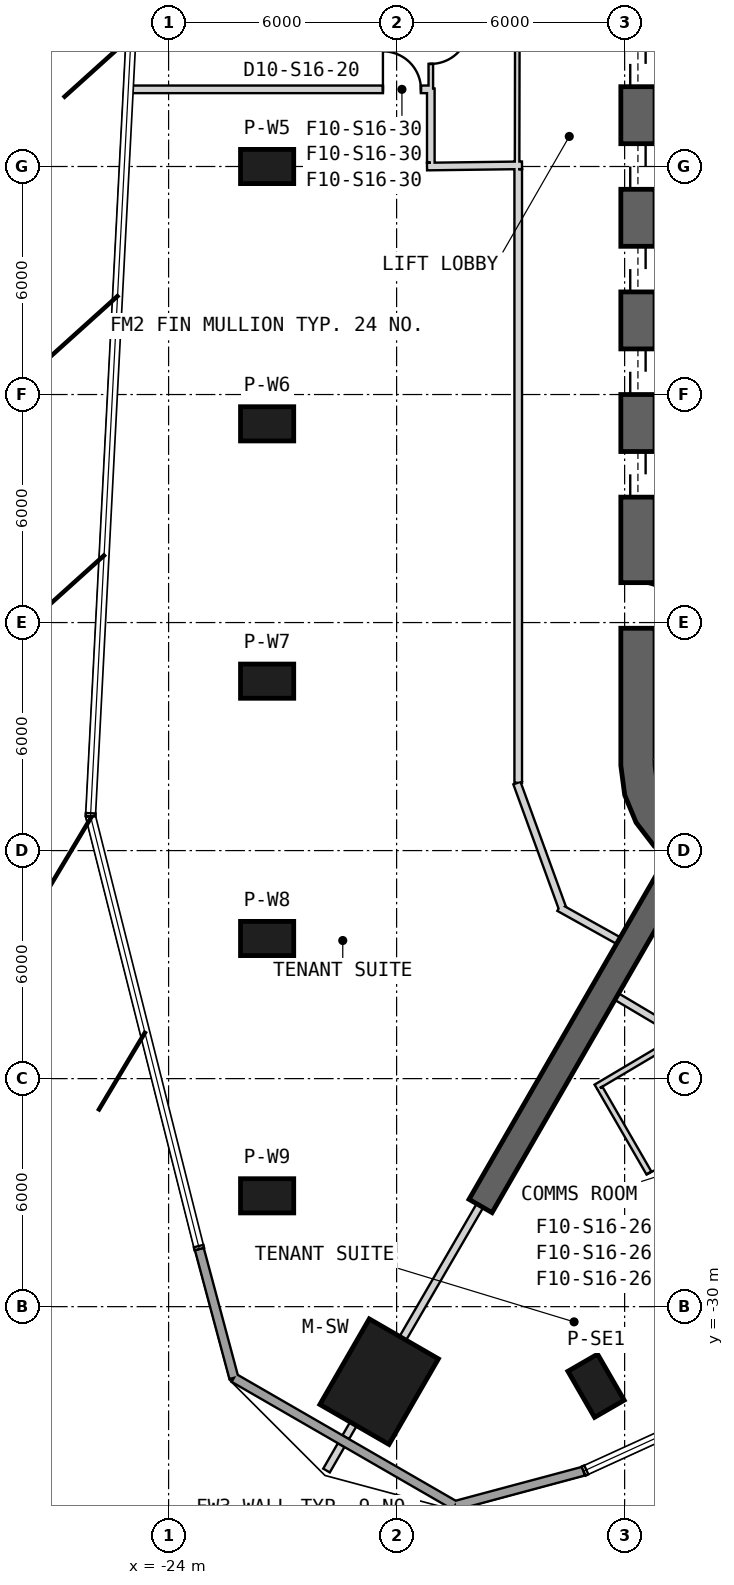
"""IFC4 building model, lengths in metres.
Left out: names, types, materials, properties, quantities, classifications, styles, units other than length and angle.
Written with IfcOpenShell. Run it as: python <this file> out.ifc"""

import sys

from ifc_helpers import new_model, si_unit, direction, frame, frame_2d, origin, origin_2d, place, context, subcontext, project, spatial, polyline, rectangle, outline, extrude, element, fill, save


model = new_model("IFC4")
c1 = context("Model", 3, precision=1e-05, world=origin(), true_north=direction((0.0, 1.0)))
c2 = subcontext(c1, "Body", "Model", "MODEL_VIEW")
j1 = project(units=[si_unit("LENGTHUNIT", "METRE"), si_unit("PLANEANGLEUNIT", "RADIAN")], contexts=[c1])
p1 = place(None, origin())
s1 = spatial("IfcSite", under=j1, at=p1, CompositionType="ELEMENT")
p2 = place(p1, origin())
s2 = spatial("IfcBuilding", under=s1, at=p2, CompositionType="ELEMENT")
p3 = place(p2, frame((0.0, 0.0, 253.2)))
s3 = spatial("IfcBuildingStorey", under=s2, at=p3, CompositionType="ELEMENT", Elevation=253.2)
p4 = place(p3, frame((-18.46, -31.974, 0.0), z_axis=(0.0, 0.0, 1.0), x_axis=(-0.5, -0.866025403784, 0.0)))
e1 = element("IfcColumn", 1, at=p4, inside=s3, PredefinedType="COLUMN", context=c2, shape_type="SweptSolid", body=[
    extrude(rectangle(XDim=2.6, YDim=2.1, at=origin_2d()), origin(), (0.0, 0.0, 1.0), 4.0),
])
for number, where, z_axis, x_axis in (
    (2, (-21.407, 0.0, 0.0), (0.0, 0.0, 1.0), (-1.0, 0.0, 0.0)),
    (3, (-21.407, -6.771, 0.0), (0.0, 0.0, 1.0), (-1.0, 0.0, 0.0)),
    (4, (-21.407, -13.542, 0.0), (0.0, 0.0, 1.0), (-1.0, 0.0, 0.0)),
    (5, (-21.407, -20.313, 0.0), (0.0, 0.0, 1.0), (-1.0, 0.0, 0.0)),
    (6, (-21.407, -27.084, 0.0), (0.0, 0.0, 1.0), (-1.0, 0.0, 0.0)),
    (7, (-12.752, -32.081, 0.0), (0.0, 0.0, 1.0), (0.5, -0.866, 0.0)),
):
    element("IfcColumn", number, at=place(p3, frame(where, z_axis=z_axis, x_axis=x_axis)), inside=s3, PredefinedType="COLUMN", context=c2, shape_type="SweptSolid", body=[
        extrude(rectangle(XDim=1.4, YDim=0.9, at=origin_2d()), origin(), (0.0, 0.0, 1.0), 4.0),
    ])
p5 = place(p3, frame((-11.65, 15.762, 0.0), z_axis=(0.0, 0.0, 1.0), x_axis=(0.0, -1.0, 0.0)))
e8 = element("IfcWall", 8, at=p5, inside=s3, PredefinedType="SHEAR", context=c2, shape_type="SweptSolid", body=[
    extrude(rectangle(XDim=31.523, YDim=0.9, at=frame_2d((15.762, 0.0))), origin(), (0.0, 0.0, 1.0), 4.0),
])
p6 = place(p5, frame((7.062, 0.0, 0.0)))
e9 = element("IfcOpeningElement", 9, at=p6, cuts=e8, PredefinedType="OPENING", context=c2, shape_type="SweptSolid", body=[
    extrude(rectangle(XDim=1.2, YDim=2.4, at=frame_2d((0.6, 1.2))), frame((0.0, 0.46, 0.0), z_axis=(0.0, -1.0, 0.0), x_axis=(1.0, 0.0, 0.0)), (0.0, 0.0, 1.0), 0.92),
])
p7 = place(p5, frame((9.762, 0.0, 0.0)))
e10 = element("IfcOpeningElement", 10, at=p7, cuts=e8, PredefinedType="OPENING", context=c2, shape_type="SweptSolid", body=[
    extrude(rectangle(XDim=1.2, YDim=2.4, at=frame_2d((0.6, 1.2))), frame((0.0, 0.46, 0.0), z_axis=(0.0, -1.0, 0.0), x_axis=(1.0, 0.0, 0.0)), (0.0, 0.0, 1.0), 0.92),
])
p8 = place(p5, frame((12.462, 0.0, 0.0)))
e11 = element("IfcOpeningElement", 11, at=p8, cuts=e8, PredefinedType="OPENING", context=c2, shape_type="SweptSolid", body=[
    extrude(rectangle(XDim=1.2, YDim=2.4, at=frame_2d((0.6, 1.2))), frame((0.0, 0.46, 0.0), z_axis=(0.0, -1.0, 0.0), x_axis=(1.0, 0.0, 0.0)), (0.0, 0.0, 1.0), 0.92),
])
p9 = place(p5, frame((15.162, 0.0, 0.0)))
e12 = element("IfcOpeningElement", 12, at=p9, cuts=e8, PredefinedType="OPENING", context=c2, shape_type="SweptSolid", body=[
    extrude(rectangle(XDim=1.2, YDim=2.4, at=frame_2d((0.6, 1.2))), frame((0.0, 0.46, 0.0), z_axis=(0.0, -1.0, 0.0), x_axis=(1.0, 0.0, 0.0)), (0.0, 0.0, 1.0), 0.92),
])
p10 = place(p5, frame((17.862, 0.0, 0.0)))
e13 = element("IfcOpeningElement", 13, at=p10, cuts=e8, PredefinedType="OPENING", context=c2, shape_type="SweptSolid", body=[
    extrude(rectangle(XDim=1.2, YDim=2.4, at=frame_2d((0.6, 1.2))), frame((0.0, 0.46, 0.0), z_axis=(0.0, -1.0, 0.0), x_axis=(1.0, 0.0, 0.0)), (0.0, 0.0, 1.0), 0.92),
])
p11 = place(p5, frame((20.562, 0.0, 0.0)))
e14 = element("IfcOpeningElement", 14, at=p11, cuts=e8, PredefinedType="OPENING", context=c2, shape_type="SweptSolid", body=[
    extrude(rectangle(XDim=1.2, YDim=2.4, at=frame_2d((0.6, 1.2))), frame((0.0, 0.46, 0.0), z_axis=(0.0, -1.0, 0.0), x_axis=(1.0, 0.0, 0.0)), (0.0, 0.0, 1.0), 0.92),
])
p12 = place(p5, frame((23.262, 0.0, 0.0)))
e15 = element("IfcOpeningElement", 15, at=p12, cuts=e8, PredefinedType="OPENING", context=c2, shape_type="SweptSolid", body=[
    extrude(rectangle(XDim=1.2, YDim=2.4, at=frame_2d((0.6, 1.2))), frame((0.0, 0.46, 0.0), z_axis=(0.0, -1.0, 0.0), x_axis=(1.0, 0.0, 0.0)), (0.0, 0.0, 1.0), 0.92),
])
p13 = place(p5, frame((3.612, 0.0, 0.0)))
e16 = element("IfcOpeningElement", 16, at=p13, cuts=e8, PredefinedType="OPENING", context=c2, shape_type="SweptSolid", body=[
    extrude(rectangle(XDim=1.2, YDim=2.4, at=frame_2d((0.6, 1.2))), frame((0.0, 0.46, 0.0), z_axis=(0.0, -1.0, 0.0), x_axis=(1.0, 0.0, 0.0)), (0.0, 0.0, 1.0), 0.92),
])
p14 = place(p5, frame((26.712, 0.0, 0.0)))
e17 = element("IfcOpeningElement", 17, at=p14, cuts=e8, PredefinedType="OPENING", context=c2, shape_type="SweptSolid", body=[
    extrude(rectangle(XDim=1.2, YDim=2.4, at=frame_2d((0.6, 1.2))), frame((0.0, 0.46, 0.0), z_axis=(0.0, -1.0, 0.0), x_axis=(1.0, 0.0, 0.0)), (0.0, 0.0, 1.0), 0.92),
])
p15 = place(p3, origin())
e18 = element("IfcWall", 18, at=p15, inside=s3, PredefinedType="SHEAR", context=c2, shape_type="SweptSolid", body=[
    extrude(outline(polyline([(-12.1, -15.762), (-11.998, -16.538), (-11.698, -17.262), (-11.221, -17.883), (-10.6, -18.36), (-9.876, -18.659), (-9.1, -18.762), (-8.323, -18.659), (-7.6, -18.36), (-8.05, -17.58), (-8.556, -17.79), (-9.1, -17.862), (-9.644, -17.79), (-10.15, -17.58), (-10.585, -17.247), (-10.919, -16.812), (-11.128, -16.305), (-11.2, -15.762), (-12.1, -15.762)])), origin(), (0.0, 0.0, 1.0), 4.0),
])
p16 = place(p3, frame((-10.575, -18.316, 0.0), z_axis=(0.0, 0.0, 1.0), x_axis=(-0.500010108608, -0.866019567498, 0.0)))
e19 = element("IfcWall", 19, at=p16, inside=s3, PredefinedType="SHEAR", context=c2, shape_type="SweptSolid", body=[
    extrude(rectangle(XDim=10.432, YDim=0.7, at=frame_2d((5.216, 0.0))), origin(), (0.0, 0.0, 1.0), 4.0),
])
p17 = place(p3, frame((-23.191, -28.484, 0.0), z_axis=(0.0, 0.0, 1.0), x_axis=(0.258818367886, -0.965926007748, 0.0)))
e20 = element("IfcWall", 20, at=p17, inside=s3, PredefinedType="SOLIDWALL", context=c2, shape_type="SweptSolid", body=[
    extrude(rectangle(XDim=3.51, YDim=0.24, at=frame_2d((1.755, 0.0))), origin(), (0.0, 0.0, 1.0), 3.7),
])
p18 = place(p3, frame((-22.283, -31.875, 0.0), z_axis=(0.0, 0.0, 1.0), x_axis=(0.86603253074, -0.499987655547, 0.0)))
e21 = element("IfcWall", 21, at=p18, inside=s3, PredefinedType="SOLIDWALL", context=c2, shape_type="SweptSolid", body=[
    extrude(rectangle(XDim=6.72, YDim=0.24, at=frame_2d((3.36, 0.0))), origin(), (0.0, 0.0, 1.0), 3.7),
])
p19 = place(p3, frame((-16.463, -35.235, 0.0), z_axis=(0.0, 0.0, 1.0), x_axis=(0.965932176707, 0.258795343857, 0.0)))
e22 = element("IfcWall", 22, at=p19, inside=s3, PredefinedType="SOLIDWALL", context=c2, shape_type="SweptSolid", body=[
    extrude(rectangle(XDim=3.501, YDim=0.24, at=frame_2d((1.75, 0.0))), origin(), (0.0, 0.0, 1.0), 3.7),
])
p20 = place(p3, frame((-11.282, -15.541, -0.3), z_axis=(0.0, 0.0, 1.0), x_axis=(0.866000483506, -0.500043160704, 0.0)))
e23 = element("IfcWall", 23, at=p20, inside=s3, PredefinedType="SHEAR", context=c2, shape_type="SweptSolid", body=[
    extrude(rectangle(XDim=3.8, YDim=0.2, at=frame_2d((1.9, 0.0))), origin(), (0.0, 0.0, 1.0), 4.0),
])
p21 = place(p3, frame((-7.196, -8.663, -0.3), z_axis=(0.0, 0.0, 1.0), x_axis=(-0.499997992926, -0.866026562566, 0.0)))
e24 = element("IfcWall", 24, at=p21, inside=s3, PredefinedType="SHEAR", context=c2, shape_type="SweptSolid", body=[
    extrude(rectangle(XDim=7.9, YDim=0.2, at=frame_2d((3.95, 0.0))), origin(), (0.0, 0.0, 1.0), 4.0),
])
p22 = place(p3, frame((-14.8, 16.257, 0.0), z_axis=(0.0, 0.0, 1.0), x_axis=(-0.001847148781, -0.999998294019, 0.0)))
e25 = element("IfcWall", 25, at=p22, inside=s3, PredefinedType="PARTITIONING", context=c2, shape_type="SweptSolid", body=[
    extrude(rectangle(XDim=16.257, YDim=0.12, at=frame_2d((8.128, 0.0))), origin(), (0.0, 0.0, 1.0), 2.98),
])
p23 = place(p22, frame((7.629, 0.0, 0.0)))
e26 = element("IfcOpeningElement", 26, at=p23, cuts=e25, PredefinedType="OPENING", context=c2, shape_type="SweptSolid", body=[
    extrude(rectangle(XDim=1.0, YDim=2.1, at=frame_2d((0.5, 1.05))), frame((0.0, 0.07, 0.0), z_axis=(0.0, -1.0, 0.0), x_axis=(1.0, 0.0, 0.0)), (0.0, 0.0, 1.0), 0.14),
])
p24 = place(p3, frame((-17.1, 4.35, 0.0), z_axis=(0.0, 0.0, 1.0), x_axis=(0.0, -1.0, 0.0)))
e27 = element("IfcWall", 27, at=p24, inside=s3, PredefinedType="PARTITIONING", context=c2, shape_type="SweptSolid", body=[
    extrude(rectangle(XDim=2.3, YDim=0.12, at=frame_2d((1.15, 0.0))), origin(), (0.0, 0.0, 1.0), 3.7),
])
p25 = place(p24, frame((0.65, 0.0, 0.0)))
e28 = element("IfcOpeningElement", 28, at=p25, cuts=e27, PredefinedType="OPENING", context=c2, shape_type="SweptSolid", body=[
    extrude(rectangle(XDim=1.0, YDim=2.1, at=frame_2d((0.5, 1.05))), frame((0.0, 0.07, 0.0), z_axis=(0.0, -1.0, 0.0), x_axis=(1.0, 0.0, 0.0)), (0.0, 0.0, 1.0), 0.14),
])
p26 = place(p3, frame((-17.2, -0.001, 0.0), z_axis=(0.0, 0.0, 1.0), x_axis=(0.999915662945, 0.012987185857, 0.0)))
e29 = element("IfcWall", 29, at=p26, inside=s3, PredefinedType="PARTITIONING", context=c2, shape_type="SweptSolid", body=[
    extrude(rectangle(XDim=2.5, YDim=0.2, at=frame_2d((1.25, 0.0))), origin(), (0.0, 0.0, 1.0), 3.07),
])
p27 = place(p3, frame((-17.1, 2.05, 0.0), z_axis=(0.0, 0.0, 1.0), x_axis=(0.0, -1.0, 0.0)))
e30 = element("IfcWall", 30, at=p27, inside=s3, PredefinedType="PARTITIONING", context=c2, shape_type="SweptSolid", body=[
    extrude(rectangle(XDim=1.95, YDim=0.2, at=frame_2d((0.975, 0.0))), origin(), (0.0, 0.0, 1.0), 3.07),
])
p28 = place(p3, frame((-13.722, -19.499, 0.0), z_axis=(0.0, 0.0, 1.0), x_axis=(0.873381780332, -0.487036205824, 0.0)))
e31 = element("IfcWall", 31, at=p28, inside=s3, PredefinedType="PARTITIONING", context=c2, shape_type="SweptSolid", body=[
    extrude(rectangle(XDim=1.785, YDim=0.2, at=frame_2d((0.892, 0.0))), origin(), (0.0, 0.0, 1.0), 3.7),
])
p29 = place(p3, frame((-14.834, -16.223, 0.0), z_axis=(0.0, 0.0, 1.0), x_axis=(0.342017717312, -0.939693503779, 0.0)))
e32 = element("IfcWall", 32, at=p29, inside=s3, PredefinedType="PARTITIONING", context=c2, shape_type="SweptSolid", body=[
    extrude(rectangle(XDim=3.497, YDim=0.2, at=frame_2d((1.749, 0.0))), origin(), (0.0, 0.0, 1.0), 2.88),
])
p30 = place(p3, frame((-14.8, -0.07, 0.0), z_axis=(0.0, 0.0, 1.0), x_axis=(0.0, -1.0, 0.0)))
e33 = element("IfcWall", 33, at=p30, inside=s3, PredefinedType="PARTITIONING", context=c2, shape_type="SweptSolid", body=[
    extrude(rectangle(XDim=16.147, YDim=0.2, at=frame_2d((8.073, 0.0))), origin(), (0.0, 0.0, 1.0), 2.98),
])
p31 = place(p3, frame((-12.207, -21.844, 0.0), z_axis=(0.0, 0.0, 1.0), x_axis=(0.859839010211, -0.510565251971, 0.0)))
e34 = element("IfcWall", 34, at=p31, inside=s3, PredefinedType="PARTITIONING", context=c2, shape_type="SweptSolid", body=[
    extrude(rectangle(XDim=2.342, YDim=0.2, at=frame_2d((1.171, 0.0))), origin(), (0.0, 0.0, 1.0), 3.7),
])
p32 = place(p3, frame((-25.061, 2.03, 0.0), z_axis=(0.0, 0.0, 1.0), x_axis=(1.0, 0.0, 0.0)))
e35 = element("IfcWall", 35, at=p32, inside=s3, PredefinedType="PARTITIONING", context=c2, shape_type="SweptSolid", body=[
    extrude(rectangle(XDim=7.901, YDim=0.2, at=frame_2d((3.95, 0.0))), origin(), (0.0, 0.0, 1.0), 3.7),
])
p33 = place(p32, frame((6.701, 0.0, 0.0)))
e36 = element("IfcOpeningElement", 36, at=p33, cuts=e35, PredefinedType="OPENING", context=c2, shape_type="SweptSolid", body=[
    extrude(rectangle(XDim=1.0, YDim=2.1, at=frame_2d((0.5, 1.05))), frame((0.0, 0.11, 0.0), z_axis=(0.0, -1.0, 0.0), x_axis=(1.0, 0.0, 0.0)), (0.0, 0.0, 1.0), 0.22),
])
p34 = place(p3, frame((-19.845, -34.312, 0.0), z_axis=(0.0, 0.0, 1.0), x_axis=(0.500151178888, 0.865938103017, 0.0)))
e37 = element("IfcWall", 37, at=p34, inside=s3, PredefinedType="PARTITIONING", context=c2, shape_type="SweptSolid", body=[
    extrude(rectangle(XDim=0.772, YDim=0.2, at=frame_2d((0.386, 0.0))), origin(), (0.0, 0.0, 1.0), 3.7),
])
p35 = place(p3, frame((-19.339, -33.436, 0.0), z_axis=(0.0, 0.0, 1.0), x_axis=(0.499896243657, 0.866085299251, 0.0)))
e38 = element("IfcWall", 38, at=p35, inside=s3, PredefinedType="PARTITIONING", context=c2, shape_type="SweptSolid", body=[
    extrude(rectangle(XDim=0.405, YDim=0.2, at=frame_2d((0.203, 0.0))), origin(), (0.0, 0.0, 1.0), 3.7),
])
p36 = place(p3, frame((-17.836, -30.833, 0.0), z_axis=(0.0, 0.0, 1.0), x_axis=(0.502422862308, 0.864622037326, 0.0)))
e39 = element("IfcWall", 39, at=p36, inside=s3, PredefinedType="PARTITIONING", context=c2, shape_type="SweptSolid", body=[
    extrude(rectangle(XDim=4.038, YDim=0.2, at=frame_2d((2.019, 0.0))), origin(), (0.0, 0.0, 1.0), 3.27),
])
p37 = place(p3, frame((-10.574, -22.93, 0.0), z_axis=(0.0, 0.0, 1.0), x_axis=(-0.86012706177, -0.510079834547, 0.0)))
e40 = element("IfcWall", 40, at=p37, inside=s3, PredefinedType="PLUMBINGWALL", context=c2, shape_type="SweptSolid", body=[
    extrude(rectangle(XDim=2.532, YDim=0.15, at=frame_2d((1.266, 0.0))), origin(), (0.0, 0.0, 1.0), 3.7),
])
p38 = place(p3, frame((-12.65, -24.249, 0.0), z_axis=(0.0, 0.0, 1.0), x_axis=(0.500027264788, -0.866009661879, 0.0)))
e41 = element("IfcWall", 41, at=p38, inside=s3, PredefinedType="PLUMBINGWALL", context=c2, shape_type="SweptSolid", body=[
    extrude(rectangle(XDim=6.24, YDim=0.15, at=frame_2d((3.12, 0.0))), origin(), (0.0, 0.0, 1.0), 2.88),
])
p39 = place(p38, frame((2.583, 0.0, 0.0)))
e42 = element("IfcOpeningElement", 42, at=p39, cuts=e41, PredefinedType="OPENING", context=c2, shape_type="SweptSolid", body=[
    extrude(rectangle(XDim=1.0, YDim=2.1, at=frame_2d((0.5, 1.05))), frame((0.0, 0.085, 0.0), z_axis=(0.0, -1.0, 0.0), x_axis=(1.0, 0.0, 0.0)), (0.0, 0.0, 1.0), 0.17),
])
p40 = place(p25, origin())
e43 = element("IfcDoor", 43, at=p40, inside=s3, OperationType="SINGLE_SWING_LEFT", PredefinedType="NOTDEFINED", context=c2, shape_type="SweptSolid", body=[
    extrude(rectangle(XDim=1.0, YDim=2.1, at=frame_2d((0.5, 1.05))), frame((0.0, 0.025, 0.0), z_axis=(0.0, -1.0, 0.0), x_axis=(1.0, 0.0, 0.0)), (0.0, 0.0, 1.0), 0.05),
])
fill(e28, e43)
p41 = place(p39, origin())
e44 = element("IfcDoor", 44, at=p41, inside=s3, OperationType="SINGLE_SWING_LEFT", PredefinedType="USERDEFINED", context=c2, shape_type="SweptSolid", body=[
    extrude(rectangle(XDim=1.0, YDim=2.1, at=frame_2d((0.5, 1.05))), frame((0.0, 0.025, 0.0), z_axis=(0.0, -1.0, 0.0), x_axis=(1.0, 0.0, 0.0)), (0.0, 0.0, 1.0), 0.05),
])
fill(e42, e44)
p42 = place(p33, origin())
e45 = element("IfcDoor", 45, at=p42, inside=s3, OperationType="SINGLE_SWING_RIGHT", PredefinedType="USERDEFINED", context=c2, shape_type="SweptSolid", body=[
    extrude(rectangle(XDim=1.0, YDim=2.1, at=frame_2d((0.5, 1.05))), frame((0.0, 0.025, 0.0), z_axis=(0.0, -1.0, 0.0), x_axis=(1.0, 0.0, 0.0)), (0.0, 0.0, 1.0), 0.05),
])
fill(e36, e45)
p43 = place(p8, origin())
e46 = element("IfcDoor", 46, at=p43, inside=s3, OperationType="SLIDING_TO_LEFT", PredefinedType="USERDEFINED", context=c2, shape_type="SweptSolid", body=[
    extrude(rectangle(XDim=1.2, YDim=2.4, at=frame_2d((0.6, 1.2))), frame((0.0, 0.025, 0.0), z_axis=(0.0, -1.0, 0.0), x_axis=(1.0, 0.0, 0.0)), (0.0, 0.0, 1.0), 0.05),
])
fill(e11, e46)
p44 = place(p9, origin())
e47 = element("IfcDoor", 47, at=p44, inside=s3, OperationType="SLIDING_TO_LEFT", PredefinedType="USERDEFINED", context=c2, shape_type="SweptSolid", body=[
    extrude(rectangle(XDim=1.2, YDim=2.4, at=frame_2d((0.6, 1.2))), frame((0.0, 0.025, 0.0), z_axis=(0.0, -1.0, 0.0), x_axis=(1.0, 0.0, 0.0)), (0.0, 0.0, 1.0), 0.05),
])
fill(e12, e47)
p45 = place(p10, origin())
e48 = element("IfcDoor", 48, at=p45, inside=s3, OperationType="SLIDING_TO_LEFT", PredefinedType="USERDEFINED", context=c2, shape_type="SweptSolid", body=[
    extrude(rectangle(XDim=1.2, YDim=2.4, at=frame_2d((0.6, 1.2))), frame((0.0, 0.025, 0.0), z_axis=(0.0, -1.0, 0.0), x_axis=(1.0, 0.0, 0.0)), (0.0, 0.0, 1.0), 0.05),
])
fill(e13, e48)
p46 = place(p11, origin())
e49 = element("IfcDoor", 49, at=p46, inside=s3, OperationType="SLIDING_TO_LEFT", PredefinedType="USERDEFINED", context=c2, shape_type="SweptSolid", body=[
    extrude(rectangle(XDim=1.2, YDim=2.4, at=frame_2d((0.6, 1.2))), frame((0.0, 0.025, 0.0), z_axis=(0.0, -1.0, 0.0), x_axis=(1.0, 0.0, 0.0)), (0.0, 0.0, 1.0), 0.05),
])
fill(e14, e49)
p47 = place(p12, origin())
e50 = element("IfcDoor", 50, at=p47, inside=s3, OperationType="SLIDING_TO_LEFT", PredefinedType="USERDEFINED", context=c2, shape_type="SweptSolid", body=[
    extrude(rectangle(XDim=1.2, YDim=2.4, at=frame_2d((0.6, 1.2))), frame((0.0, 0.025, 0.0), z_axis=(0.0, -1.0, 0.0), x_axis=(1.0, 0.0, 0.0)), (0.0, 0.0, 1.0), 0.05),
])
fill(e15, e50)
p48 = place(p14, origin())
e51 = element("IfcDoor", 51, at=p48, inside=s3, OperationType="SINGLE_SWING_RIGHT", PredefinedType="USERDEFINED", context=c2, shape_type="SweptSolid", body=[
    extrude(rectangle(XDim=1.2, YDim=2.4, at=frame_2d((0.6, 1.2))), frame((0.0, 0.025, 0.0), z_axis=(0.0, -1.0, 0.0), x_axis=(1.0, 0.0, 0.0)), (0.0, 0.0, 1.0), 0.05),
])
fill(e17, e51)
save(model, sys.argv[1])
